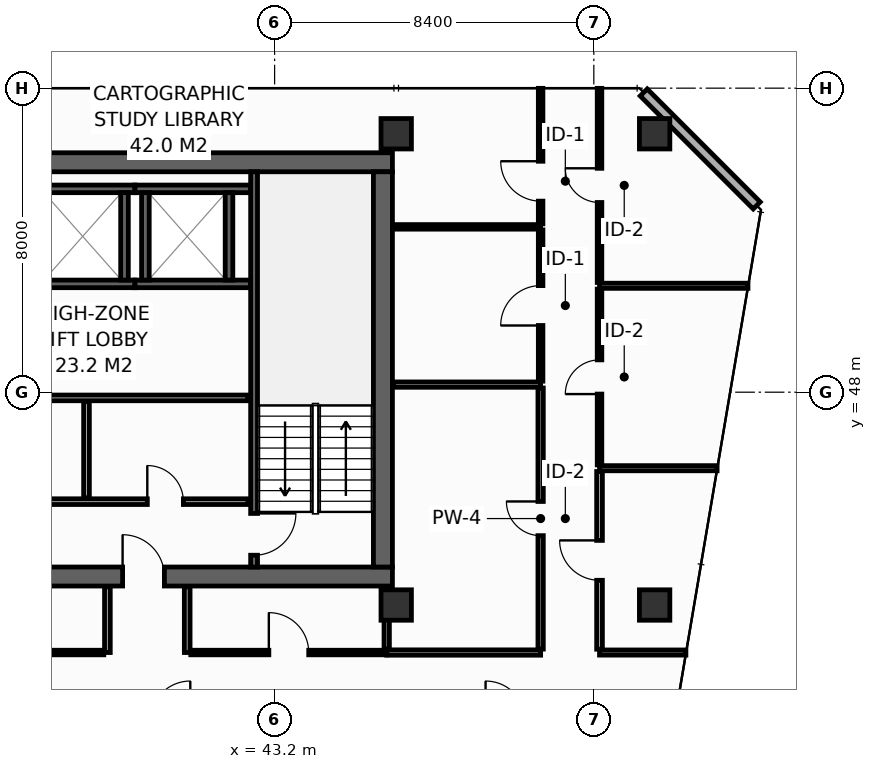
"""IFC4 building model, lengths in metres.
Left out: names, types, materials, properties, quantities, classifications, styles, units other than length and angle.
Written with IfcOpenShell. Run it as: python <this file> out.ifc"""

import sys

from ifc_helpers import new_model, si_unit, direction, frame, frame_2d, origin, origin_2d, place, context, subcontext, project, spatial, rectangle, hollow_rectangle, extrude, element, fill, save


model = new_model("IFC4")
c1 = context("Model", 3, precision=1e-05, world=origin(), true_north=direction((0.0, 1.0)))
c2 = subcontext(c1, "Body", "Model", "MODEL_VIEW")
j1 = project(units=[si_unit("LENGTHUNIT", "METRE"), si_unit("PLANEANGLEUNIT", "RADIAN")], contexts=[c1])
p1 = place(None, origin())
s1 = spatial("IfcSite", under=j1, at=p1, CompositionType="ELEMENT")
p2 = place(p1, origin())
s2 = spatial("IfcBuilding", under=s1, at=p2, CompositionType="ELEMENT")
p3 = place(p2, frame((0.0, 0.0, 190.4)))
s3 = spatial("IfcBuildingStorey", under=s2, at=p3, CompositionType="ELEMENT", Elevation=190.4)
p4 = place(p3, frame((13.6, 43.15, 0.0), z_axis=(0.0, 0.0, 1.0), x_axis=(1.0, 0.0, 0.0)))
e1 = element("IfcWall", 1, at=p4, inside=s3, PredefinedType="SHEAR", context=c2, shape_type="SweptSolid", body=[
    extrude(rectangle(XDim=32.7, YDim=0.5, at=frame_2d((16.35, 0.0))), origin(), (0.0, 0.0, 1.0), 3.55),
])
p5 = place(p4, frame((5.4, 0.0, 0.0)))
e2 = element("IfcOpeningElement", 2, at=p5, cuts=e1, PredefinedType="OPENING", context=c2, shape_type="SweptSolid", body=[
    extrude(rectangle(XDim=1.1, YDim=2.15, at=frame_2d((0.55, 1.075))), frame((0.0, 0.26, 0.0), z_axis=(0.0, -1.0, 0.0), x_axis=(1.0, 0.0, 0.0)), (0.0, 0.0, 1.0), 0.52),
])
p6 = place(p4, frame((25.6, 0.0, 0.0)))
e3 = element("IfcOpeningElement", 3, at=p6, cuts=e1, PredefinedType="OPENING", context=c2, shape_type="SweptSolid", body=[
    extrude(rectangle(XDim=1.1, YDim=2.15, at=frame_2d((0.55, 1.075))), frame((0.0, 0.26, 0.0), z_axis=(0.0, -1.0, 0.0), x_axis=(1.0, 0.0, 0.0)), (0.0, 0.0, 1.0), 0.52),
])
p7 = place(p3, frame((13.6, 54.05, 0.0), z_axis=(0.0, 0.0, 1.0), x_axis=(1.0, 0.0, 0.0)))
e4 = element("IfcWall", 4, at=p7, inside=s3, PredefinedType="SHEAR", context=c2, shape_type="SweptSolid", body=[
    extrude(rectangle(XDim=32.7, YDim=0.5, at=frame_2d((16.35, 0.0))), origin(), (0.0, 0.0, 1.0), 3.55),
])
p8 = place(p3, frame((46.05, 43.4, 0.0), z_axis=(0.0, 0.0, 1.0), x_axis=(0.0, 1.0, 0.0)))
e5 = element("IfcWall", 5, at=p8, inside=s3, PredefinedType="SHEAR", context=c2, shape_type="SweptSolid", body=[
    extrude(rectangle(XDim=10.4, YDim=0.5, at=frame_2d((5.2, 0.0))), origin(), (0.0, 0.0, 1.0), 3.55),
])
for number, where, z_axis, x_axis in (
    (6, (46.4, 54.8, 0.0), (0.0, 0.0, 1.0), (1.0, 0.0, 0.0)),
    (7, (53.2, 54.8, 0.0), (0.0, 0.0, 1.0), (1.0, 0.0, 0.0)),
    (8, (46.4, 42.4, 0.0), (0.0, 0.0, 1.0), (1.0, 0.0, 0.0)),
    (9, (53.2, 42.4, 0.0), (0.0, 0.0, 1.0), (1.0, 0.0, 0.0)),
):
    element("IfcColumn", number, at=place(p3, frame(where, z_axis=z_axis, x_axis=x_axis)), inside=s3, PredefinedType="COLUMN", context=c2, shape_type="SweptSolid", body=[
        extrude(hollow_rectangle(XDim=0.8, YDim=0.8, WallThickness=0.036, at=origin_2d()), origin(), (0.0, 0.0, 1.0), 3.8),
    ])
for number, where, z_axis, x_axis in (
    (10, (36.775, 50.85, 0.0), (0.0, 0.0, 1.0), (1.0, 0.0, 0.0)),
    (11, (36.775, 53.35, 0.0), (0.0, 0.0, 1.0), (1.0, 0.0, 0.0)),
):
    element("IfcWall", number, at=place(p3, frame(where, z_axis=z_axis, x_axis=x_axis)), inside=s3, PredefinedType="SHEAR", context=c2, shape_type="SweptSolid", body=[
        extrude(rectangle(XDim=2.75, YDim=0.2, at=frame_2d((1.375, 0.0))), origin(), (0.0, 0.0, 1.0), 3.55),
    ])
p9 = place(p3, frame((39.25, 50.95, 0.0), z_axis=(0.0, 0.0, 1.0), x_axis=(0.0, 1.0, 0.0)))
e12 = element("IfcWall", 12, at=p9, inside=s3, PredefinedType="SHEAR", context=c2, shape_type="SweptSolid", body=[
    extrude(rectangle(XDim=2.3, YDim=0.2, at=frame_2d((1.15, 0.0))), origin(), (0.0, 0.0, 1.0), 3.55),
])
for number, where, z_axis, x_axis in (
    (13, (39.525, 50.85, 0.0), (0.0, 0.0, 1.0), (1.0, 0.0, 0.0)),
    (14, (39.525, 53.35, 0.0), (0.0, 0.0, 1.0), (1.0, 0.0, 0.0)),
):
    element("IfcWall", number, at=place(p3, frame(where, z_axis=z_axis, x_axis=x_axis)), inside=s3, PredefinedType="SHEAR", context=c2, shape_type="SweptSolid", body=[
        extrude(rectangle(XDim=3.045, YDim=0.2, at=frame_2d((1.522, 0.0))), origin(), (0.0, 0.0, 1.0), 3.55),
    ])
for number, where, z_axis, x_axis in (
    (15, (39.8, 50.95, 0.0), (0.0, 0.0, 1.0), (0.0, 1.0, 0.0)),
    (16, (42.0, 50.95, 0.0), (0.0, 0.0, 1.0), (0.0, 1.0, 0.0)),
):
    element("IfcWall", number, at=place(p3, frame(where, z_axis=z_axis, x_axis=x_axis)), inside=s3, PredefinedType="SHEAR", context=c2, shape_type="SweptSolid", body=[
        extrude(rectangle(XDim=2.3, YDim=0.2, at=frame_2d((1.15, 0.0))), origin(), (0.0, 0.0, 1.0), 3.55),
    ])
p10 = place(p3, frame((42.66, 53.8, 0.0), z_axis=(0.0, 0.0, 1.0), x_axis=(0.0, -1.0, 0.0)))
e17 = element("IfcWall", 17, at=p10, inside=s3, PredefinedType="SHEAR", context=c2, shape_type="SweptSolid", body=[
    extrude(rectangle(XDim=10.4, YDim=0.18, at=frame_2d((5.2, 0.0))), origin(), (0.0, 0.0, 1.0), 3.55),
])
p11 = place(p10, frame((8.99, 0.0, 0.0)))
e18 = element("IfcOpeningElement", 18, at=p11, cuts=e17, PredefinedType="OPENING", context=c2, shape_type="SweptSolid", body=[
    extrude(rectangle(XDim=1.1, YDim=2.15, at=frame_2d((0.55, 1.075))), frame((0.0, 0.1, 0.0), z_axis=(0.0, -1.0, 0.0), x_axis=(1.0, 0.0, 0.0)), (0.0, 0.0, 1.0), 0.2),
])
p12 = place(p3, frame((34.05, 45.12, 0.0), z_axis=(0.0, 0.0, 1.0), x_axis=(1.0, 0.0, 0.0)))
e19 = element("IfcWall", 19, at=p12, inside=s3, PredefinedType="PARTITIONING", context=c2, shape_type="SweptSolid", body=[
    extrude(rectangle(XDim=8.45, YDim=0.15, at=frame_2d((4.225, 0.0))), origin(), (0.0, 0.0, 1.0), 3.55),
])
p13 = place(p12, frame((1.5, 0.0, 0.0)))
e20 = element("IfcOpeningElement", 20, at=p13, cuts=e19, PredefinedType="OPENING", context=c2, shape_type="SweptSolid", body=[
    extrude(rectangle(XDim=0.95, YDim=2.15, at=frame_2d((0.475, 1.075))), frame((0.0, 0.085, 0.0), z_axis=(0.0, -1.0, 0.0), x_axis=(1.0, 0.0, 0.0)), (0.0, 0.0, 1.0), 0.17),
])
p14 = place(p12, frame((5.8, 0.0, 0.0)))
e21 = element("IfcOpeningElement", 21, at=p14, cuts=e19, PredefinedType="OPENING", context=c2, shape_type="SweptSolid", body=[
    extrude(rectangle(XDim=0.95, YDim=2.15, at=frame_2d((0.475, 1.075))), frame((0.0, 0.085, 0.0), z_axis=(0.0, -1.0, 0.0), x_axis=(1.0, 0.0, 0.0)), (0.0, 0.0, 1.0), 0.17),
])
p15 = place(p3, frame((34.05, 47.85, 0.0), z_axis=(0.0, 0.0, 1.0), x_axis=(1.0, 0.0, 0.0)))
e22 = element("IfcWall", 22, at=p15, inside=s3, PredefinedType="PARTITIONING", context=c2, shape_type="SweptSolid", body=[
    extrude(rectangle(XDim=8.45, YDim=0.15, at=frame_2d((4.225, 0.0))), origin(), (0.0, 0.0, 1.0), 3.55),
])
p16 = place(p3, frame((38.25, 45.22, 0.0), z_axis=(0.0, 0.0, 1.0), x_axis=(0.0, 1.0, 0.0)))
e23 = element("IfcWall", 23, at=p16, inside=s3, PredefinedType="PARTITIONING", context=c2, shape_type="SweptSolid", body=[
    extrude(rectangle(XDim=2.53, YDim=0.15, at=frame_2d((1.265, 0.0))), origin(), (0.0, 0.0, 1.0), 3.55),
])
p17 = place(p3, frame((55.887, 52.913, 0.0), z_axis=(0.0, 0.0, 1.0), x_axis=(-0.707106781187, 0.707106781187, 0.0)))
e24 = element("IfcWall", 24, at=p17, inside=s3, PredefinedType="STANDARD", context=c2, shape_type="SweptSolid", body=[
    extrude(rectangle(XDim=4.206, YDim=0.26, at=frame_2d((2.103, 0.0))), origin(), (0.0, 0.0, 1.0), 3.55),
])
p18 = place(p3, frame((46.15, 41.15, 0.0), z_axis=(0.0, 0.0, 1.0), x_axis=(1.0, 0.0, 0.0)))
e25 = element("IfcWall", 25, at=p18, inside=s3, PredefinedType="PARTITIONING", context=c2, shape_type="SweptSolid", body=[
    extrude(rectangle(XDim=4.05, YDim=0.14, at=frame_2d((2.025, 0.0))), origin(), (0.0, 0.0, 1.0), 3.55),
])
p19 = place(p3, frame((46.15, 41.24, 0.0), z_axis=(0.0, 0.0, 1.0), x_axis=(0.0, 1.0, 0.0)))
e26 = element("IfcWall", 26, at=p19, inside=s3, PredefinedType="PARTITIONING", context=c2, shape_type="SweptSolid", body=[
    extrude(rectangle(XDim=1.64, YDim=0.14, at=frame_2d((0.82, 0.0))), origin(), (0.0, 0.0, 1.0), 3.55),
])
p20 = place(p3, frame((46.32, 48.2, 0.0), z_axis=(0.0, 0.0, 1.0), x_axis=(1.0, 0.0, 0.0)))
e27 = element("IfcWall", 27, at=p20, inside=s3, PredefinedType="PARTITIONING", context=c2, shape_type="SweptSolid", body=[
    extrude(rectangle(XDim=3.88, YDim=0.14, at=frame_2d((1.94, 0.0))), origin(), (0.0, 0.0, 1.0), 3.55),
])
p21 = place(p3, frame((50.2, 41.24, 0.0), z_axis=(0.0, 0.0, 1.0), x_axis=(0.0, 1.0, 0.0)))
e28 = element("IfcWall", 28, at=p21, inside=s3, PredefinedType="PARTITIONING", context=c2, shape_type="SweptSolid", body=[
    extrude(rectangle(XDim=6.87, YDim=0.14, at=frame_2d((3.435, 0.0))), origin(), (0.0, 0.0, 1.0), 2.835),
])
p22 = place(p21, frame((2.985, 0.0, 0.0)))
e29 = element("IfcOpeningElement", 29, at=p22, cuts=e28, PredefinedType="OPENING", context=c2, shape_type="SweptSolid", body=[
    extrude(rectangle(XDim=0.9, YDim=2.1, at=frame_2d((0.45, 1.05))), frame((0.0, 0.08, 0.0), z_axis=(0.0, -1.0, 0.0), x_axis=(1.0, 0.0, 0.0)), (0.0, 0.0, 1.0), 0.16),
])
p23 = place(p3, frame((46.32, 52.35, 0.0), z_axis=(0.0, 0.0, 1.0), x_axis=(1.0, 0.0, 0.0)))
e30 = element("IfcWall", 30, at=p23, inside=s3, PredefinedType="PARTITIONING", context=c2, shape_type="SweptSolid", body=[
    extrude(rectangle(XDim=3.88, YDim=0.12, at=frame_2d((1.94, 0.0))), origin(), (0.0, 0.0, 1.0), 3.55),
])
p24 = place(p3, frame((50.2, 48.29, 0.0), z_axis=(0.0, 0.0, 1.0), x_axis=(0.0, 1.0, 0.0)))
e31 = element("IfcWall", 31, at=p24, inside=s3, PredefinedType="PARTITIONING", context=c2, shape_type="SweptSolid", body=[
    extrude(rectangle(XDim=3.98, YDim=0.12, at=frame_2d((1.99, 0.0))), origin(), (0.0, 0.0, 1.0), 3.55),
])
p25 = place(p24, frame((1.465, 0.0, 0.0)))
e32 = element("IfcOpeningElement", 32, at=p25, cuts=e31, PredefinedType="OPENING", context=c2, shape_type="SweptSolid", body=[
    extrude(rectangle(XDim=1.05, YDim=2.15, at=frame_2d((0.525, 1.075))), frame((0.0, 0.07, 0.0), z_axis=(0.0, -1.0, 0.0), x_axis=(1.0, 0.0, 0.0)), (0.0, 0.0, 1.0), 0.14),
])
p26 = place(p3, frame((50.2, 52.43, 0.0), z_axis=(0.0, 0.0, 1.0), x_axis=(0.0, 1.0, 0.0)))
e33 = element("IfcWall", 33, at=p26, inside=s3, PredefinedType="PARTITIONING", context=c2, shape_type="SweptSolid", body=[
    extrude(rectangle(XDim=3.565, YDim=0.12, at=frame_2d((1.783, 0.0))), origin(), (0.0, 0.0, 1.0), 2.935),
])
p27 = place(p26, frame((0.597, 0.0, 0.0)))
e34 = element("IfcOpeningElement", 34, at=p27, cuts=e33, PredefinedType="OPENING", context=c2, shape_type="SweptSolid", body=[
    extrude(rectangle(XDim=1.05, YDim=2.15, at=frame_2d((0.525, 1.075))), frame((0.0, 0.07, 0.0), z_axis=(0.0, -1.0, 0.0), x_axis=(1.0, 0.0, 0.0)), (0.0, 0.0, 1.0), 0.14),
])
p28 = place(p3, frame((51.75, 41.15, 0.0), z_axis=(0.0, 0.0, 1.0), x_axis=(1.0, 0.0, 0.0)))
e35 = element("IfcWall", 35, at=p28, inside=s3, PredefinedType="PARTITIONING", context=c2, shape_type="SweptSolid", body=[
    extrude(rectangle(XDim=2.273, YDim=0.135, at=frame_2d((1.136, 0.0))), origin(), (0.0, 0.0, 1.0), 3.035),
])
p29 = place(p3, frame((51.75, 46.0, 0.0), z_axis=(0.0, 0.0, 1.0), x_axis=(1.0, 0.0, 0.0)))
e36 = element("IfcWall", 36, at=p29, inside=s3, PredefinedType="PARTITIONING", context=c2, shape_type="SweptSolid", body=[
    extrude(rectangle(XDim=3.094, YDim=0.135, at=frame_2d((1.547, 0.0))), origin(), (0.0, 0.0, 1.0), 2.835),
])
p30 = place(p3, frame((51.75, 50.8, 0.0), z_axis=(0.0, 0.0, 1.0), x_axis=(1.0, 0.0, 0.0)))
e37 = element("IfcWall", 37, at=p30, inside=s3, PredefinedType="PARTITIONING", context=c2, shape_type="SweptSolid", body=[
    extrude(rectangle(XDim=3.906, YDim=0.135, at=frame_2d((1.953, 0.0))), origin(), (0.0, 0.0, 1.0), 2.835),
])
p31 = place(p3, frame((51.75, 41.238, 0.0), z_axis=(0.0, 0.0, 1.0), x_axis=(0.0, 1.0, 0.0)))
e38 = element("IfcWall", 38, at=p31, inside=s3, PredefinedType="PARTITIONING", context=c2, shape_type="SweptSolid", body=[
    extrude(rectangle(XDim=4.675, YDim=0.15, at=frame_2d((2.337, 0.0))), origin(), (0.0, 0.0, 1.0), 2.835),
])
p32 = place(p31, frame((1.813, 0.0, 0.0)))
e39 = element("IfcOpeningElement", 39, at=p32, cuts=e38, PredefinedType="OPENING", context=c2, shape_type="SweptSolid", body=[
    extrude(rectangle(XDim=1.05, YDim=2.15, at=frame_2d((0.525, 1.075))), frame((0.0, 0.085, 0.0), z_axis=(0.0, -1.0, 0.0), x_axis=(1.0, 0.0, 0.0)), (0.0, 0.0, 1.0), 0.17),
])
p33 = place(p3, frame((51.75, 46.087, 0.0), z_axis=(0.0, 0.0, 1.0), x_axis=(0.0, 1.0, 0.0)))
e40 = element("IfcWall", 40, at=p33, inside=s3, PredefinedType="PARTITIONING", context=c2, shape_type="SweptSolid", body=[
    extrude(rectangle(XDim=4.625, YDim=0.12, at=frame_2d((2.312, 0.0))), origin(), (0.0, 0.0, 1.0), 3.55),
])
p34 = place(p33, frame((1.863, 0.0, 0.0)))
e41 = element("IfcOpeningElement", 41, at=p34, cuts=e40, PredefinedType="OPENING", context=c2, shape_type="SweptSolid", body=[
    extrude(rectangle(XDim=0.9, YDim=2.1, at=frame_2d((0.45, 1.05))), frame((0.0, 0.07, 0.0), z_axis=(0.0, -1.0, 0.0), x_axis=(1.0, 0.0, 0.0)), (0.0, 0.0, 1.0), 0.14),
])
p35 = place(p3, frame((51.75, 50.887, 0.0), z_axis=(0.0, 0.0, 1.0), x_axis=(0.0, 1.0, 0.0)))
e42 = element("IfcWall", 42, at=p35, inside=s3, PredefinedType="PARTITIONING", context=c2, shape_type="SweptSolid", body=[
    extrude(rectangle(XDim=5.108, YDim=0.12, at=frame_2d((2.554, 0.0))), origin(), (0.0, 0.0, 1.0), 2.935),
])
p36 = place(p35, frame((2.104, 0.0, 0.0)))
e43 = element("IfcOpeningElement", 43, at=p36, cuts=e42, PredefinedType="OPENING", context=c2, shape_type="SweptSolid", body=[
    extrude(rectangle(XDim=0.9, YDim=2.1, at=frame_2d((0.45, 1.05))), frame((0.0, 0.07, 0.0), z_axis=(0.0, -1.0, 0.0), x_axis=(1.0, 0.0, 0.0)), (0.0, 0.0, 1.0), 0.14),
])
for number, where, z_axis, x_axis in (
    (44, (38.8, 41.15, 0.0), (0.0, 0.0, 1.0), (0.0, 1.0, 0.0)),
    (45, (40.9, 41.15, 0.0), (0.0, 0.0, 1.0), (0.0, 1.0, 0.0)),
):
    element("IfcWall", number, at=place(p3, frame(where, z_axis=z_axis, x_axis=x_axis)), inside=s3, PredefinedType="PARTITIONING", context=c2, shape_type="SweptSolid", body=[
        extrude(rectangle(XDim=1.73, YDim=0.15, at=frame_2d((0.865, 0.0))), origin(), (0.0, 0.0, 1.0), 3.55),
    ])
p37 = place(p3, frame((20.795, 41.15, 0.0), z_axis=(0.0, 0.0, 1.0), x_axis=(1.0, 0.0, 0.0)))
e46 = element("IfcWall", 46, at=p37, inside=s3, PredefinedType="PARTITIONING", context=c2, shape_type="SweptSolid", body=[
    extrude(rectangle(XDim=17.91, YDim=0.12, at=frame_2d((8.955, 0.0))), origin(), (0.0, 0.0, 1.0), 2.835),
])
p38 = place(p37, frame((8.43, 0.0, 0.0)))
e47 = element("IfcOpeningElement", 47, at=p38, cuts=e46, PredefinedType="OPENING", context=c2, shape_type="SweptSolid", body=[
    extrude(rectangle(XDim=1.05, YDim=2.15, at=frame_2d((0.525, 1.075))), frame((0.0, 0.07, 0.0), z_axis=(0.0, -1.0, 0.0), x_axis=(1.0, 0.0, 0.0)), (0.0, 0.0, 1.0), 0.14),
])
p39 = place(p3, frame((40.995, 41.15, 0.0), z_axis=(0.0, 0.0, 1.0), x_axis=(1.0, 0.0, 0.0)))
e48 = element("IfcWall", 48, at=p39, inside=s3, PredefinedType="PARTITIONING", context=c2, shape_type="SweptSolid", body=[
    extrude(rectangle(XDim=5.155, YDim=0.12, at=frame_2d((2.577, 0.0))), origin(), (0.0, 0.0, 1.0), 3.55),
])
p40 = place(p39, frame((2.053, 0.0, 0.0)))
e49 = element("IfcOpeningElement", 49, at=p40, cuts=e48, PredefinedType="OPENING", context=c2, shape_type="SweptSolid", body=[
    extrude(rectangle(XDim=1.05, YDim=2.15, at=frame_2d((0.525, 1.075))), frame((0.0, 0.07, 0.0), z_axis=(0.0, -1.0, 0.0), x_axis=(1.0, 0.0, 0.0)), (0.0, 0.0, 1.0), 0.14),
])
p41 = place(p11, origin())
e50 = element("IfcDoor", 50, at=p41, inside=s3, OperationType="SINGLE_SWING_LEFT", PredefinedType="DOOR", context=c2, shape_type="SweptSolid", body=[
    extrude(rectangle(XDim=1.1, YDim=2.15, at=frame_2d((0.55, 1.075))), frame((0.0, 0.025, 0.0), z_axis=(0.0, -1.0, 0.0), x_axis=(1.0, 0.0, 0.0)), (0.0, 0.0, 1.0), 0.05),
])
fill(e18, e50)
p42 = place(p6, origin())
e51 = element("IfcDoor", 51, at=p42, inside=s3, OperationType="SINGLE_SWING_LEFT", PredefinedType="DOOR", context=c2, shape_type="SweptSolid", body=[
    extrude(rectangle(XDim=1.1, YDim=2.15, at=frame_2d((0.55, 1.075))), frame((0.0, 0.025, 0.0), z_axis=(0.0, -1.0, 0.0), x_axis=(1.0, 0.0, 0.0)), (0.0, 0.0, 1.0), 0.05),
])
fill(e3, e51)
p43 = place(p14, origin())
e52 = element("IfcDoor", 52, at=p43, inside=s3, OperationType="SINGLE_SWING_LEFT", PredefinedType="DOOR", context=c2, shape_type="SweptSolid", body=[
    extrude(rectangle(XDim=0.95, YDim=2.15, at=frame_2d((0.475, 1.075))), frame((0.0, 0.025, 0.0), z_axis=(0.0, -1.0, 0.0), x_axis=(1.0, 0.0, 0.0)), (0.0, 0.0, 1.0), 0.05),
])
fill(e21, e52)
p44 = place(p22, origin())
e53 = element("IfcDoor", 53, at=p44, inside=s3, OperationType="SINGLE_SWING_RIGHT", PredefinedType="DOOR", context=c2, shape_type="SweptSolid", body=[
    extrude(rectangle(XDim=0.9, YDim=2.1, at=frame_2d((0.45, 1.05))), frame((0.0, 0.025, 0.0), z_axis=(0.0, -1.0, 0.0), x_axis=(1.0, 0.0, 0.0)), (0.0, 0.0, 1.0), 0.05),
])
fill(e29, e53)
p45 = place(p25, origin())
e54 = element("IfcDoor", 54, at=p45, inside=s3, OperationType="SINGLE_SWING_LEFT", PredefinedType="DOOR", context=c2, shape_type="SweptSolid", body=[
    extrude(rectangle(XDim=1.05, YDim=2.15, at=frame_2d((0.525, 1.075))), frame((0.0, 0.025, 0.0), z_axis=(0.0, -1.0, 0.0), x_axis=(1.0, 0.0, 0.0)), (0.0, 0.0, 1.0), 0.05),
])
fill(e32, e54)
p46 = place(p27, origin())
e55 = element("IfcDoor", 55, at=p46, inside=s3, OperationType="SINGLE_SWING_RIGHT", PredefinedType="DOOR", context=c2, shape_type="SweptSolid", body=[
    extrude(rectangle(XDim=1.05, YDim=2.15, at=frame_2d((0.525, 1.075))), frame((0.0, 0.025, 0.0), z_axis=(0.0, -1.0, 0.0), x_axis=(1.0, 0.0, 0.0)), (0.0, 0.0, 1.0), 0.05),
])
fill(e34, e55)
p47 = place(p32, origin())
e56 = element("IfcDoor", 56, at=p47, inside=s3, OperationType="SINGLE_SWING_RIGHT", PredefinedType="DOOR", context=c2, shape_type="SweptSolid", body=[
    extrude(rectangle(XDim=1.05, YDim=2.15, at=frame_2d((0.525, 1.075))), frame((0.0, 0.025, 0.0), z_axis=(0.0, -1.0, 0.0), x_axis=(1.0, 0.0, 0.0)), (0.0, 0.0, 1.0), 0.05),
])
fill(e39, e56)
p48 = place(p34, origin())
e57 = element("IfcDoor", 57, at=p48, inside=s3, OperationType="SINGLE_SWING_LEFT", PredefinedType="DOOR", context=c2, shape_type="SweptSolid", body=[
    extrude(rectangle(XDim=0.9, YDim=2.1, at=frame_2d((0.45, 1.05))), frame((0.0, 0.025, 0.0), z_axis=(0.0, -1.0, 0.0), x_axis=(1.0, 0.0, 0.0)), (0.0, 0.0, 1.0), 0.05),
])
fill(e41, e57)
p49 = place(p36, origin())
e58 = element("IfcDoor", 58, at=p49, inside=s3, OperationType="SINGLE_SWING_RIGHT", PredefinedType="DOOR", context=c2, shape_type="SweptSolid", body=[
    extrude(rectangle(XDim=0.9, YDim=2.1, at=frame_2d((0.45, 1.05))), frame((0.0, 0.025, 0.0), z_axis=(0.0, -1.0, 0.0), x_axis=(1.0, 0.0, 0.0)), (0.0, 0.0, 1.0), 0.05),
])
fill(e43, e58)
p50 = place(p40, origin())
e59 = element("IfcDoor", 59, at=p50, inside=s3, OperationType="SINGLE_SWING_LEFT", PredefinedType="DOOR", context=c2, shape_type="SweptSolid", body=[
    extrude(rectangle(XDim=1.05, YDim=2.15, at=frame_2d((0.525, 1.075))), frame((0.0, 0.025, 0.0), z_axis=(0.0, -1.0, 0.0), x_axis=(1.0, 0.0, 0.0)), (0.0, 0.0, 1.0), 0.05),
])
fill(e49, e59)
save(model, sys.argv[1])
